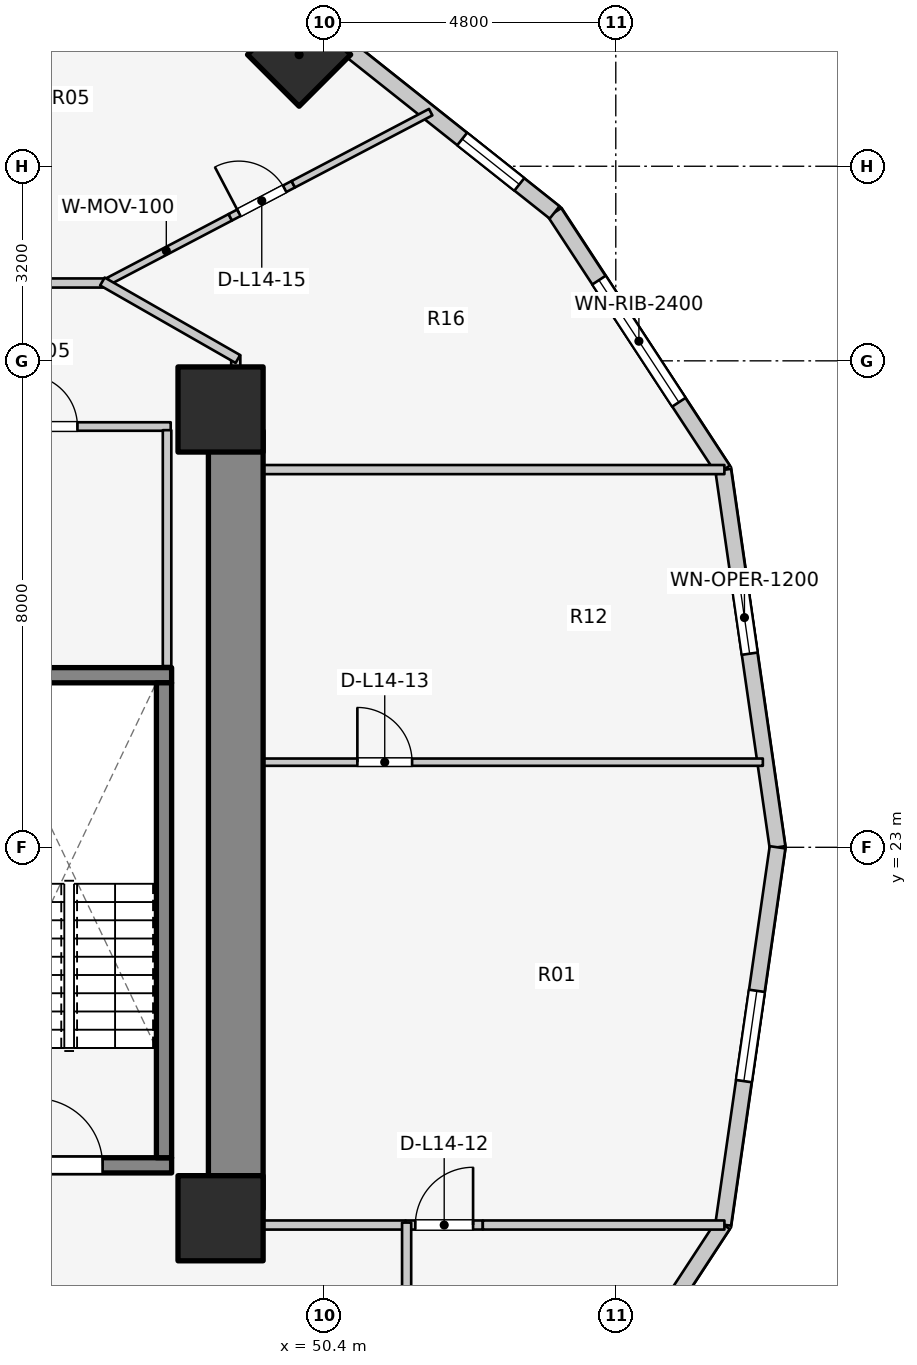
"""IFC4 building model, lengths in metres.
Left out: names, types, materials, properties, quantities, classifications, styles, units other than length and angle.
Written with IfcOpenShell. Run it as: python <this file> out.ifc"""

import sys

from ifc_helpers import new_model, si_unit, direction, frame, frame_2d, origin, origin_2d, place, context, subcontext, project, spatial, rectangle, extrude, element, fill, save


model = new_model("IFC4")
c1 = context("Model", 3, precision=1e-05, world=origin(), true_north=direction((0.0, 1.0)))
c2 = subcontext(c1, "Body", "Model", "MODEL_VIEW")
j1 = project(units=[si_unit("LENGTHUNIT", "METRE"), si_unit("PLANEANGLEUNIT", "RADIAN")], contexts=[c1])
p1 = place(None, origin())
s1 = spatial("IfcSite", under=j1, at=p1, CompositionType="ELEMENT")
p2 = place(p1, origin())
s2 = spatial("IfcBuilding", under=s1, at=p2, CompositionType="ELEMENT")
p3 = place(p2, frame((0.0, 0.0, 49.3)))
s3 = spatial("IfcBuildingStorey", under=s2, at=p3, CompositionType="ELEMENT", Elevation=49.3)
p4 = place(p3, frame((48.95, 17.05, 0.0), z_axis=(0.0, 0.0, 1.0), x_axis=(0.0, 1.0, 0.0)))
e1 = element("IfcWall", 1, at=p4, inside=s3, PredefinedType="SHEAR", context=c2, shape_type="SweptSolid", body=[
    extrude(rectangle(XDim=12.8, YDim=0.9, at=frame_2d((6.4, 0.0))), origin(), (0.0, 0.0, 1.0), 3.1),
])
p5 = place(p3, frame((44.525, 17.77, 0.0), z_axis=(0.0, 0.0, 1.0), x_axis=(1.0, 0.0, 0.0)))
e2 = element("IfcWall", 2, at=p5, inside=s3, PredefinedType="SOLIDWALL", context=c2, shape_type="SweptSolid", body=[
    extrude(rectangle(XDim=3.37, YDim=0.25, at=frame_2d((1.685, 0.0))), origin(), (0.0, 0.0, 1.0), 3.1),
])
p6 = place(p5, frame((1.135, 0.0, 0.0)))
e3 = element("IfcOpeningElement", 3, at=p6, cuts=e2, PredefinedType="OPENING", context=c2, shape_type="SweptSolid", body=[
    extrude(rectangle(XDim=1.1, YDim=2.1, at=frame_2d((0.55, 1.05))), frame((0.0, 0.135, 0.0), z_axis=(0.0, -1.0, 0.0), x_axis=(1.0, 0.0, 0.0)), (0.0, 0.0, 1.0), 0.27),
])
p7 = place(p3, frame((44.525, 25.83, 0.0), z_axis=(0.0, 0.0, 1.0), x_axis=(1.0, 0.0, 0.0)))
e4 = element("IfcWall", 4, at=p7, inside=s3, PredefinedType="SOLIDWALL", context=c2, shape_type="SweptSolid", body=[
    extrude(rectangle(XDim=3.37, YDim=0.25, at=frame_2d((1.685, 0.0))), origin(), (0.0, 0.0, 1.0), 3.1),
])
p8 = place(p3, frame((47.77, 17.895, 0.0), z_axis=(0.0, 0.0, 1.0), x_axis=(0.0, 1.0, 0.0)))
e5 = element("IfcWall", 5, at=p8, inside=s3, PredefinedType="SOLIDWALL", context=c2, shape_type="SweptSolid", body=[
    extrude(rectangle(XDim=7.81, YDim=0.25, at=frame_2d((3.905, 0.0))), origin(), (0.0, 0.0, 1.0), 3.1),
])
for number, where, z_axis, x_axis in (
    (6, (48.7, 16.9, 0.0), (0.0, 0.0, 1.0), (1.0, 0.0, 0.0)),
    (7, (48.7, 30.2, 0.0), (0.0, 0.0, 1.0), (1.0, 0.0, 0.0)),
):
    element("IfcColumn", number, at=place(p3, frame(where, z_axis=z_axis, x_axis=x_axis)), inside=s3, PredefinedType="COLUMN", context=c2, shape_type="SweptSolid", body=[
        extrude(rectangle(XDim=1.4, YDim=1.4, at=origin_2d()), origin(), (0.0, 0.0, 1.0), 3.1),
    ])
p9 = place(p3, frame((49.992, 36.035, 0.0), z_axis=(0.0, 0.0, 1.0), x_axis=(0.707106781187, 0.707106781187, 0.0)))
e8 = element("IfcColumn", 8, at=p9, inside=s3, PredefinedType="COLUMN", context=c2, shape_type="SweptSolid", body=[
    extrude(rectangle(XDim=1.2, YDim=1.2, at=origin_2d()), origin(), (0.0, 0.0, 1.0), 3.1),
])
p10 = place(p3, frame((57.86, 23.0, 0.0), z_axis=(0.0, 0.0, 1.0), x_axis=(-0.142528001686, 0.989790770181, 0.0)))
e9 = element("IfcWall", 9, at=p10, inside=s3, PredefinedType="STANDARD", context=c2, shape_type="SweptSolid", body=[
    extrude(rectangle(XDim=6.269, YDim=0.26, at=frame_2d((3.135, 0.0))), origin(), (0.0, 0.0, 1.0), 2.85),
])
p11 = place(p10, frame((3.217, 0.0, 0.75)))
e10 = element("IfcOpeningElement", 10, at=p11, cuts=e9, PredefinedType="OPENING", context=c2, shape_type="SweptSolid", body=[
    extrude(rectangle(XDim=1.2, YDim=1.5, at=frame_2d((0.6, 0.75))), frame((0.0, 0.14, 0.0), z_axis=(0.0, -1.0, 0.0), x_axis=(1.0, 0.0, 0.0)), (0.0, 0.0, 1.0), 0.28),
])
p12 = place(p3, frame((56.967, 29.205, 0.0), z_axis=(0.0, 0.0, 1.0), x_axis=(-0.547702757047, 0.836672988642, 0.0)))
e11 = element("IfcWall", 11, at=p12, inside=s3, PredefinedType="STANDARD", context=c2, shape_type="SweptSolid", body=[
    extrude(rectangle(XDim=5.062, YDim=0.26, at=frame_2d((2.531, 0.0))), origin(), (0.0, 0.0, 1.0), 2.85),
])
p13 = place(p12, frame((1.331, 0.0, 0.75)))
e12 = element("IfcOpeningElement", 12, at=p13, cuts=e11, PredefinedType="OPENING", context=c2, shape_type="SweptSolid", body=[
    extrude(rectangle(XDim=2.4, YDim=1.7, at=frame_2d((1.2, 0.85))), frame((0.0, 0.14, 0.0), z_axis=(0.0, -1.0, 0.0), x_axis=(1.0, 0.0, 0.0)), (0.0, 0.0, 1.0), 0.28),
])
p14 = place(p3, frame((54.194, 33.441, 0.0), z_axis=(0.0, 0.0, 1.0), x_axis=(-0.783123133379, 0.621866672179, 0.0)))
e13 = element("IfcWall", 13, at=p14, inside=s3, PredefinedType="STANDARD", context=c2, shape_type="SweptSolid", body=[
    extrude(rectangle(XDim=4.839, YDim=0.26, at=frame_2d((2.419, 0.0))), origin(), (0.0, 0.0, 1.0), 2.85),
])
p15 = place(p14, frame((0.741, 0.0, 0.75)))
e14 = element("IfcOpeningElement", 14, at=p15, cuts=e13, PredefinedType="OPENING", context=c2, shape_type="SweptSolid", body=[
    extrude(rectangle(XDim=1.2, YDim=1.5, at=frame_2d((0.6, 0.75))), frame((0.0, 0.14, 0.0), z_axis=(0.0, -1.0, 0.0), x_axis=(1.0, 0.0, 0.0)), (0.0, 0.0, 1.0), 0.28),
])
p16 = place(p3, frame((54.194, 12.559, 0.0), z_axis=(0.0, 0.0, 1.0), x_axis=(0.547702757047, 0.836672988642, 0.0)))
e15 = element("IfcWall", 15, at=p16, inside=s3, PredefinedType="STANDARD", context=c2, shape_type="SweptSolid", body=[
    extrude(rectangle(XDim=5.062, YDim=0.26, at=frame_2d((2.531, 0.0))), origin(), (0.0, 0.0, 1.0), 2.85),
])
p17 = place(p16, frame((1.331, 0.0, 0.75)))
e16 = element("IfcOpeningElement", 16, at=p17, cuts=e15, PredefinedType="OPENING", context=c2, shape_type="SweptSolid", body=[
    extrude(rectangle(XDim=2.4, YDim=1.7, at=frame_2d((1.2, 0.85))), frame((0.0, 0.14, 0.0), z_axis=(0.0, -1.0, 0.0), x_axis=(1.0, 0.0, 0.0)), (0.0, 0.0, 1.0), 0.28),
])
p18 = place(p3, frame((56.967, 16.795, 0.0), z_axis=(0.0, 0.0, 1.0), x_axis=(0.142528001686, 0.989790770181, 0.0)))
e17 = element("IfcWall", 17, at=p18, inside=s3, PredefinedType="STANDARD", context=c2, shape_type="SweptSolid", body=[
    extrude(rectangle(XDim=6.269, YDim=0.26, at=frame_2d((3.135, 0.0))), origin(), (0.0, 0.0, 1.0), 2.85),
])
p19 = place(p18, frame((2.385, 0.0, 0.75)))
e18 = element("IfcOpeningElement", 18, at=p19, cuts=e17, PredefinedType="OPENING", context=c2, shape_type="SweptSolid", body=[
    extrude(rectangle(XDim=1.5, YDim=1.6, at=frame_2d((0.75, 0.8))), frame((0.0, 0.14, 0.0), z_axis=(0.0, -1.0, 0.0), x_axis=(1.0, 0.0, 0.0)), (0.0, 0.0, 1.0), 0.28),
])
p20 = place(p3, frame((44.98, 29.92, 0.0), z_axis=(0.0, 0.0, 1.0), x_axis=(1.0, 0.0, 0.0)))
e19 = element("IfcWall", 19, at=p20, inside=s3, PredefinedType="PLUMBINGWALL", context=c2, shape_type="SweptSolid", body=[
    extrude(rectangle(XDim=2.9, YDim=0.14, at=frame_2d((1.45, 0.0))), origin(), (0.0, 0.0, 1.0), 2.855),
])
p21 = place(p20, frame((0.516, 0.0, 0.0)))
e20 = element("IfcOpeningElement", 20, at=p21, cuts=e19, PredefinedType="OPENING", context=c2, shape_type="SweptSolid", body=[
    extrude(rectangle(XDim=0.85, YDim=2.05, at=frame_2d((0.425, 1.025))), frame((0.0, 0.08, 0.0), z_axis=(0.0, -1.0, 0.0), x_axis=(1.0, 0.0, 0.0)), (0.0, 0.0, 1.0), 0.16),
])
p22 = place(p3, frame((47.82, 25.98, 0.0), z_axis=(0.0, 0.0, 1.0), x_axis=(0.0, 1.0, 0.0)))
e21 = element("IfcWall", 21, at=p22, inside=s3, PredefinedType="PLUMBINGWALL", context=c2, shape_type="SweptSolid", body=[
    extrude(rectangle(XDim=3.88, YDim=0.14, at=frame_2d((1.94, 0.0))), origin(), (0.0, 0.0, 1.0), 2.855),
])
p23 = place(p3, frame((48.95, 16.788, 0.0), z_axis=(0.0, 0.0, 1.0), x_axis=(1.0, 0.0, 0.0)))
e22 = element("IfcWall", 22, at=p23, inside=s3, PredefinedType="PARTITIONING", context=c2, shape_type="SweptSolid", body=[
    extrude(rectangle(XDim=2.793, YDim=0.15, at=frame_2d((1.396, 0.0))), origin(), (0.0, 0.0, 1.0), 2.069),
])
p24 = place(p3, frame((51.743, 16.788, 0.0), z_axis=(0.0, 0.0, 1.0), x_axis=(1.0, 0.0, 0.0)))
e23 = element("IfcWall", 23, at=p24, inside=s3, PredefinedType="PARTITIONING", context=c2, shape_type="SweptSolid", body=[
    extrude(rectangle(XDim=1.27, YDim=0.15, at=frame_2d((0.635, 0.0))), origin(), (0.0, 0.0, 1.0), 2.855),
])
p25 = place(p24, frame((0.16, 0.0, 0.0)))
e24 = element("IfcOpeningElement", 24, at=p25, cuts=e23, PredefinedType="OPENING", context=c2, shape_type="SweptSolid", body=[
    extrude(rectangle(XDim=0.95, YDim=2.1, at=frame_2d((0.475, 1.05))), frame((0.0, 0.085, 0.0), z_axis=(0.0, -1.0, 0.0), x_axis=(1.0, 0.0, 0.0)), (0.0, 0.0, 1.0), 0.17),
])
p26 = place(p3, frame((53.013, 16.788, 0.0), z_axis=(0.0, 0.0, 1.0), x_axis=(1.0, 0.0, 0.0)))
e25 = element("IfcWall", 25, at=p26, inside=s3, PredefinedType="PARTITIONING", context=c2, shape_type="SweptSolid", body=[
    extrude(rectangle(XDim=3.973, YDim=0.15, at=frame_2d((1.987, 0.0))), origin(), (0.0, 0.0, 1.0), 2.855),
])
p27 = place(p3, frame((48.95, 29.212, 0.0), z_axis=(0.0, 0.0, 1.0), x_axis=(1.0, 0.0, 0.0)))
e26 = element("IfcWall", 26, at=p27, inside=s3, PredefinedType="PARTITIONING", context=c2, shape_type="SweptSolid", body=[
    extrude(rectangle(XDim=8.036, YDim=0.15, at=frame_2d((4.018, 0.0))), origin(), (0.0, 0.0, 1.0), 2.855),
])
p28 = place(p3, frame((48.95, 24.4, 0.0), z_axis=(0.0, 0.0, 1.0), x_axis=(1.0, 0.0, 0.0)))
e27 = element("IfcWall", 27, at=p28, inside=s3, PredefinedType="MOVABLE", context=c2, shape_type="SweptSolid", body=[
    extrude(rectangle(XDim=8.669, YDim=0.12, at=frame_2d((4.334, 0.0))), origin(), (0.0, 0.0, 1.0), 2.855),
])
p29 = place(p28, frame((2.0, 0.0, 0.0)))
e28 = element("IfcOpeningElement", 28, at=p29, cuts=e27, PredefinedType="OPENING", context=c2, shape_type="SweptSolid", body=[
    extrude(rectangle(XDim=0.9, YDim=2.1, at=frame_2d((0.45, 1.05))), frame((0.0, 0.07, 0.0), z_axis=(0.0, -1.0, 0.0), x_axis=(1.0, 0.0, 0.0)), (0.0, 0.0, 1.0), 0.14),
])
p30 = place(p3, frame((48.95, 29.8, 0.0), z_axis=(0.0, 0.0, 1.0), x_axis=(0.0, 1.0, 0.0)))
e29 = element("IfcWall", 29, at=p30, inside=s3, PredefinedType="PARTITIONING", context=c2, shape_type="SweptSolid", body=[
    extrude(rectangle(XDim=1.29, YDim=0.15, at=frame_2d((0.645, 0.0))), origin(), (0.0, 0.0, 1.0), 2.069),
])
p31 = place(p3, frame((46.756, 32.257, 0.0), z_axis=(0.0, 0.0, 1.0), x_axis=(0.885586030676, 0.464475383924, 0.0)))
e30 = element("IfcWall", 30, at=p31, inside=s3, PredefinedType="MOVABLE", context=c2, shape_type="SweptSolid", body=[
    extrude(rectangle(XDim=2.376, YDim=0.12, at=frame_2d((1.188, 0.0))), origin(), (0.0, 0.0, 1.0), 2.855),
])
p32 = place(p3, frame((48.86, 33.36, 0.0), z_axis=(0.0, 0.0, 1.0), x_axis=(0.885447282698, 0.464739829972, 0.0)))
e31 = element("IfcWall", 31, at=p32, inside=s3, PredefinedType="MOVABLE", context=c2, shape_type="SweptSolid", body=[
    extrude(rectangle(XDim=1.17, YDim=0.12, at=frame_2d((0.585, 0.0))), origin(), (0.0, 0.0, 1.0), 2.11),
])
p33 = place(p32, frame((0.16, 0.0, 0.0)))
e32 = element("IfcOpeningElement", 32, at=p33, cuts=e31, PredefinedType="OPENING", context=c2, shape_type="SweptSolid", body=[
    extrude(rectangle(XDim=0.85, YDim=2.05, at=frame_2d((0.425, 1.025))), frame((0.0, 0.07, 0.0), z_axis=(0.0, -1.0, 0.0), x_axis=(1.0, 0.0, 0.0)), (0.0, 0.0, 1.0), 0.14),
])
p34 = place(p3, frame((49.896, 33.904, 0.0), z_axis=(0.0, 0.0, 1.0), x_axis=(0.885573027611, 0.464500175208, 0.0)))
e33 = element("IfcWall", 33, at=p34, inside=s3, PredefinedType="MOVABLE", context=c2, shape_type="SweptSolid", body=[
    extrude(rectangle(XDim=2.552, YDim=0.12, at=frame_2d((1.276, 0.0))), origin(), (0.0, 0.0, 1.0), 2.855),
])
p35 = place(p3, frame((39.33, 32.28, 0.0), z_axis=(0.0, 0.0, 1.0), x_axis=(1.0, 0.0, 0.0)))
e34 = element("IfcWall", 34, at=p35, inside=s3, PredefinedType="PARTITIONING", context=c2, shape_type="SweptSolid", body=[
    extrude(rectangle(XDim=7.52, YDim=0.15, at=frame_2d((3.76, 0.0))), origin(), (0.0, 0.0, 1.0), 2.237),
])
p36 = place(p35, frame((5.22, 0.0, 0.0)))
e35 = element("IfcOpeningElement", 35, at=p36, cuts=e34, PredefinedType="OPENING", context=c2, shape_type="SweptSolid", body=[
    extrude(rectangle(XDim=0.9, YDim=2.1, at=frame_2d((0.45, 1.05))), frame((0.0, 0.085, 0.0), z_axis=(0.0, -1.0, 0.0), x_axis=(1.0, 0.0, 0.0)), (0.0, 0.0, 1.0), 0.17),
])
p37 = place(p3, frame((46.757, 32.305, 0.0), z_axis=(0.0, 0.0, 1.0), x_axis=(0.867991349648, -0.496579315857, 0.0)))
e36 = element("IfcWall", 36, at=p37, inside=s3, PredefinedType="PARTITIONING", context=c2, shape_type="SweptSolid", body=[
    extrude(rectangle(XDim=2.567, YDim=0.15, at=frame_2d((1.283, 0.0))), origin(), (0.0, 0.0, 1.0), 2.069),
])
p38 = place(p3, frame((51.76, 13.68, 0.0), z_axis=(0.0, 0.0, 1.0), x_axis=(0.0, 1.0, 0.0)))
e37 = element("IfcWall", 37, at=p38, inside=s3, PredefinedType="PARTITIONING", context=c2, shape_type="SweptSolid", body=[
    extrude(rectangle(XDim=3.148, YDim=0.15, at=frame_2d((1.574, 0.0))), origin(), (0.0, 0.0, 1.0), 2.855),
])
p39 = place(p11, origin())
e38 = element("IfcWindow", 38, at=p39, inside=s3, PartitioningType="SINGLE_PANEL", PredefinedType="WINDOW", context=c2, shape_type="SweptSolid", body=[
    extrude(rectangle(XDim=1.2, YDim=1.5, at=frame_2d((0.6, 0.75))), frame((0.0, 0.03, 0.0), z_axis=(0.0, -1.0, 0.0), x_axis=(1.0, 0.0, 0.0)), (0.0, 0.0, 1.0), 0.06),
])
fill(e10, e38)
p40 = place(p13, origin())
e39 = element("IfcWindow", 39, at=p40, inside=s3, PartitioningType="SINGLE_PANEL", PredefinedType="WINDOW", context=c2, shape_type="SweptSolid", body=[
    extrude(rectangle(XDim=2.4, YDim=1.7, at=frame_2d((1.2, 0.85))), frame((0.0, 0.03, 0.0), z_axis=(0.0, -1.0, 0.0), x_axis=(1.0, 0.0, 0.0)), (0.0, 0.0, 1.0), 0.06),
])
fill(e12, e39)
p41 = place(p15, origin())
e40 = element("IfcWindow", 40, at=p41, inside=s3, PartitioningType="SINGLE_PANEL", PredefinedType="WINDOW", context=c2, shape_type="SweptSolid", body=[
    extrude(rectangle(XDim=1.2, YDim=1.5, at=frame_2d((0.6, 0.75))), frame((0.0, 0.03, 0.0), z_axis=(0.0, -1.0, 0.0), x_axis=(1.0, 0.0, 0.0)), (0.0, 0.0, 1.0), 0.06),
])
fill(e14, e40)
p42 = place(p19, origin())
e41 = element("IfcWindow", 41, at=p42, inside=s3, PartitioningType="SINGLE_PANEL", PredefinedType="WINDOW", context=c2, shape_type="SweptSolid", body=[
    extrude(rectangle(XDim=1.5, YDim=1.6, at=frame_2d((0.75, 0.8))), frame((0.0, 0.03, 0.0), z_axis=(0.0, -1.0, 0.0), x_axis=(1.0, 0.0, 0.0)), (0.0, 0.0, 1.0), 0.06),
])
fill(e18, e41)
p43 = place(p6, origin())
e42 = element("IfcDoor", 42, at=p43, inside=s3, OperationType="SINGLE_SWING_LEFT", PredefinedType="DOOR", context=c2, shape_type="SweptSolid", body=[
    extrude(rectangle(XDim=1.1, YDim=2.1, at=frame_2d((0.55, 1.05))), frame((0.0, 0.025, 0.0), z_axis=(0.0, -1.0, 0.0), x_axis=(1.0, 0.0, 0.0)), (0.0, 0.0, 1.0), 0.05),
])
fill(e3, e42)
p44 = place(p21, origin())
e43 = element("IfcDoor", 43, at=p44, inside=s3, OperationType="SINGLE_SWING_LEFT", PredefinedType="DOOR", context=c2, shape_type="SweptSolid", body=[
    extrude(rectangle(XDim=0.85, YDim=2.05, at=frame_2d((0.425, 1.025))), frame((0.0, 0.025, 0.0), z_axis=(0.0, -1.0, 0.0), x_axis=(1.0, 0.0, 0.0)), (0.0, 0.0, 1.0), 0.05),
])
fill(e20, e43)
p45 = place(p25, origin())
e44 = element("IfcDoor", 44, at=p45, inside=s3, OperationType="SINGLE_SWING_RIGHT", PredefinedType="DOOR", context=c2, shape_type="SweptSolid", body=[
    extrude(rectangle(XDim=0.95, YDim=2.1, at=frame_2d((0.475, 1.05))), frame((0.0, 0.025, 0.0), z_axis=(0.0, -1.0, 0.0), x_axis=(1.0, 0.0, 0.0)), (0.0, 0.0, 1.0), 0.05),
])
fill(e24, e44)
p46 = place(p29, origin())
e45 = element("IfcDoor", 45, at=p46, inside=s3, OperationType="SINGLE_SWING_LEFT", PredefinedType="DOOR", context=c2, shape_type="SweptSolid", body=[
    extrude(rectangle(XDim=0.9, YDim=2.1, at=frame_2d((0.45, 1.05))), frame((0.0, 0.025, 0.0), z_axis=(0.0, -1.0, 0.0), x_axis=(1.0, 0.0, 0.0)), (0.0, 0.0, 1.0), 0.05),
])
fill(e28, e45)
p47 = place(p33, origin())
e46 = element("IfcDoor", 46, at=p47, inside=s3, OperationType="SINGLE_SWING_LEFT", PredefinedType="DOOR", context=c2, shape_type="SweptSolid", body=[
    extrude(rectangle(XDim=0.85, YDim=2.05, at=frame_2d((0.425, 1.025))), frame((0.0, 0.025, 0.0), z_axis=(0.0, -1.0, 0.0), x_axis=(1.0, 0.0, 0.0)), (0.0, 0.0, 1.0), 0.05),
])
fill(e32, e46)
save(model, sys.argv[1])
